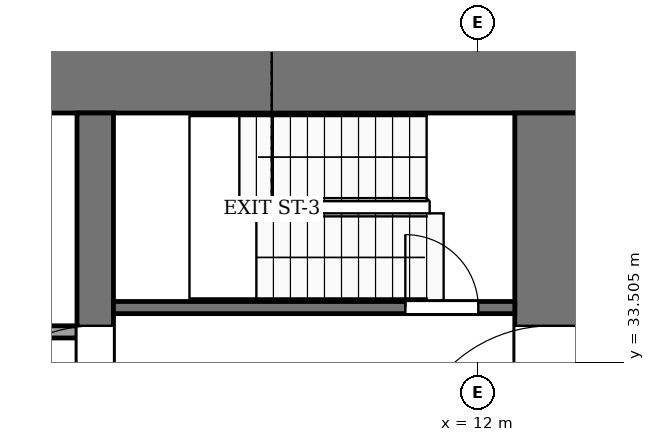
"""IFC4 building model, lengths in metres.
Left out: names, types, materials, properties, quantities, classifications, styles, units other than length and angle.
Written with IfcOpenShell. Run it as: python <this file> out.ifc"""

import sys

from ifc_helpers import new_model, si_unit, direction, frame, frame_2d, origin, place, context, subcontext, project, spatial, rectangle, extrude, element, fill, save


model = new_model("IFC4")
c1 = context("Model", 3, precision=1e-05, world=origin(), true_north=direction((0.0, 1.0)))
c2 = subcontext(c1, "Body", "Model", "MODEL_VIEW")
j1 = project(units=[si_unit("LENGTHUNIT", "METRE"), si_unit("PLANEANGLEUNIT", "RADIAN")], contexts=[c1])
p1 = place(None, origin())
s1 = spatial("IfcSite", under=j1, at=p1, CompositionType="ELEMENT")
p2 = place(p1, origin())
s2 = spatial("IfcBuilding", under=s1, at=p2, CompositionType="ELEMENT")
p3 = place(p2, frame((0.0, 0.0, 90.0)))
s3 = spatial("IfcBuildingStorey", under=s2, at=p3, CompositionType="ELEMENT", Elevation=90.0)
p4 = place(p3, frame((-13.8, 38.2, -0.13), z_axis=(0.0, 0.0, 1.0), x_axis=(1.0, 0.0, 0.0)))
e1 = element("IfcWall", 1, at=p4, inside=s3, PredefinedType="SHEAR", context=c2, shape_type="SweptSolid", body=[
    extrude(rectangle(XDim=27.6, YDim=1.2, at=frame_2d((13.8, 0.0))), origin(), (0.0, 0.0, 1.0), 4.0),
])
p5 = place(p3, frame((13.2, 18.4, -0.13), z_axis=(0.0, 0.0, 1.0), x_axis=(0.0, 1.0, 0.0)))
e2 = element("IfcWall", 2, at=p5, inside=s3, PredefinedType="SHEAR", context=c2, shape_type="SweptSolid", body=[
    extrude(rectangle(XDim=19.2, YDim=1.2, at=frame_2d((9.6, 0.0))), origin(), (0.0, 0.0, 1.0), 4.0),
])
p6 = place(p5, frame((2.8, 0.0, 0.13)))
e3 = element("IfcOpeningElement", 3, at=p6, cuts=e2, PredefinedType="OPENING", context=c2, shape_type="SweptSolid", body=[
    extrude(rectangle(XDim=2.4, YDim=2.4, at=frame_2d((1.2, 1.2))), frame((0.0, 0.61, 0.0), z_axis=(0.0, -1.0, 0.0), x_axis=(1.0, 0.0, 0.0)), (0.0, 0.0, 1.0), 1.22),
])
p7 = place(p5, frame((13.3, 0.0, 0.13)))
e4 = element("IfcOpeningElement", 4, at=p7, cuts=e2, PredefinedType="OPENING", context=c2, shape_type="SweptSolid", body=[
    extrude(rectangle(XDim=2.4, YDim=2.4, at=frame_2d((1.2, 1.2))), frame((0.0, 0.61, 0.0), z_axis=(0.0, -1.0, 0.0), x_axis=(1.0, 0.0, 0.0)), (0.0, 0.0, 1.0), 1.22),
])
p8 = place(p3, frame((5.7, 18.4, -0.13), z_axis=(0.0, 0.0, 1.0), x_axis=(0.0, 1.0, 0.0)))
e5 = element("IfcWall", 5, at=p8, inside=s3, PredefinedType="SHEAR", context=c2, shape_type="SweptSolid", body=[
    extrude(rectangle(XDim=19.2, YDim=0.6, at=frame_2d((9.6, 0.0))), origin(), (0.0, 0.0, 1.0), 4.0),
])
p9 = place(p8, frame((8.35, 0.0, 0.13)))
e6 = element("IfcOpeningElement", 6, at=p9, cuts=e5, PredefinedType="OPENING", context=c2, shape_type="SweptSolid", body=[
    extrude(rectangle(XDim=0.9, YDim=2.1, at=frame_2d((0.45, 1.05))), frame((0.0, 0.31, 0.0), z_axis=(0.0, -1.0, 0.0), x_axis=(1.0, 0.0, 0.0)), (0.0, 0.0, 1.0), 0.62),
])
p10 = place(p8, frame((13.3, 0.0, 0.13)))
e7 = element("IfcOpeningElement", 7, at=p10, cuts=e5, PredefinedType="OPENING", context=c2, shape_type="SweptSolid", body=[
    extrude(rectangle(XDim=2.4, YDim=2.4, at=frame_2d((1.2, 1.2))), frame((0.0, 0.31, 0.0), z_axis=(0.0, -1.0, 0.0), x_axis=(1.0, 0.0, 0.0)), (0.0, 0.0, 1.0), 0.62),
])
p11 = place(p3, frame((-5.4, 34.0, 0.0), z_axis=(0.0, 0.0, 1.0), x_axis=(1.0, 0.0, 0.0)))
e8 = element("IfcWall", 8, at=p11, inside=s3, PredefinedType="PARTITIONING", context=c2, shape_type="SweptSolid", body=[
    extrude(rectangle(XDim=10.8, YDim=0.2, at=frame_2d((5.4, 0.0))), origin(), (0.0, 0.0, 1.0), 3.87),
])
p12 = place(p11, frame((6.15, 0.0, 0.0)))
e9 = element("IfcOpeningElement", 9, at=p12, cuts=e8, PredefinedType="OPENING", context=c2, shape_type="SweptSolid", body=[
    extrude(rectangle(XDim=1.2, YDim=2.2, at=frame_2d((0.6, 1.1))), frame((0.0, 0.11, 0.0), z_axis=(0.0, -1.0, 0.0), x_axis=(1.0, 0.0, 0.0)), (0.0, 0.0, 1.0), 0.22),
])
p13 = place(p11, frame((8.95, 0.0, 0.0)))
e10 = element("IfcOpeningElement", 10, at=p13, cuts=e8, PredefinedType="OPENING", context=c2, shape_type="SweptSolid", body=[
    extrude(rectangle(XDim=1.0, YDim=2.1, at=frame_2d((0.5, 1.05))), frame((0.0, 0.11, 0.0), z_axis=(0.0, -1.0, 0.0), x_axis=(1.0, 0.0, 0.0)), (0.0, 0.0, 1.0), 0.22),
])
p14 = place(p3, frame((6.0, 34.4, 0.0), z_axis=(0.0, 0.0, 1.0), x_axis=(1.0, 0.0, 0.0)))
e11 = element("IfcWall", 11, at=p14, inside=s3, PredefinedType="PARTITIONING", context=c2, shape_type="SweptSolid", body=[
    extrude(rectangle(XDim=6.6, YDim=0.2, at=frame_2d((3.3, 0.0))), origin(), (0.0, 0.0, 1.0), 3.87),
])
p15 = place(p14, frame((4.8, 0.0, 0.0)))
e12 = element("IfcOpeningElement", 12, at=p15, cuts=e11, PredefinedType="OPENING", context=c2, shape_type="SweptSolid", body=[
    extrude(rectangle(XDim=1.2, YDim=2.2, at=frame_2d((0.6, 1.1))), frame((0.0, 0.11, 0.0), z_axis=(0.0, -1.0, 0.0), x_axis=(1.0, 0.0, 0.0)), (0.0, 0.0, 1.0), 0.22),
])
p16 = place(p15, origin())
e13 = element("IfcDoor", 13, at=p16, inside=s3, OperationType="SINGLE_SWING_RIGHT", PredefinedType="DOOR", context=c2, shape_type="SweptSolid", body=[
    extrude(rectangle(XDim=1.2, YDim=2.2, at=frame_2d((0.6, 1.1))), frame((0.0, 0.025, 0.0), z_axis=(0.0, -1.0, 0.0), x_axis=(1.0, 0.0, 0.0)), (0.0, 0.0, 1.0), 0.05),
])
fill(e12, e13)
p17 = place(p10, origin())
e14 = element("IfcDoor", 14, at=p17, inside=s3, OperationType="DOUBLE_DOOR_SINGLE_SWING", PredefinedType="DOOR", context=c2, shape_type="SweptSolid", body=[
    extrude(rectangle(XDim=2.4, YDim=2.4, at=frame_2d((1.2, 1.2))), frame((0.0, 0.025, 0.0), z_axis=(0.0, -1.0, 0.0), x_axis=(1.0, 0.0, 0.0)), (0.0, 0.0, 1.0), 0.05),
])
fill(e7, e14)
p18 = place(p7, origin())
e15 = element("IfcDoor", 15, at=p18, inside=s3, OperationType="DOUBLE_DOOR_SINGLE_SWING", PredefinedType="DOOR", context=c2, shape_type="SweptSolid", body=[
    extrude(rectangle(XDim=2.4, YDim=2.4, at=frame_2d((1.2, 1.2))), frame((0.0, 0.025, 0.0), z_axis=(0.0, -1.0, 0.0), x_axis=(1.0, 0.0, 0.0)), (0.0, 0.0, 1.0), 0.05),
])
fill(e4, e15)
save(model, sys.argv[1])
